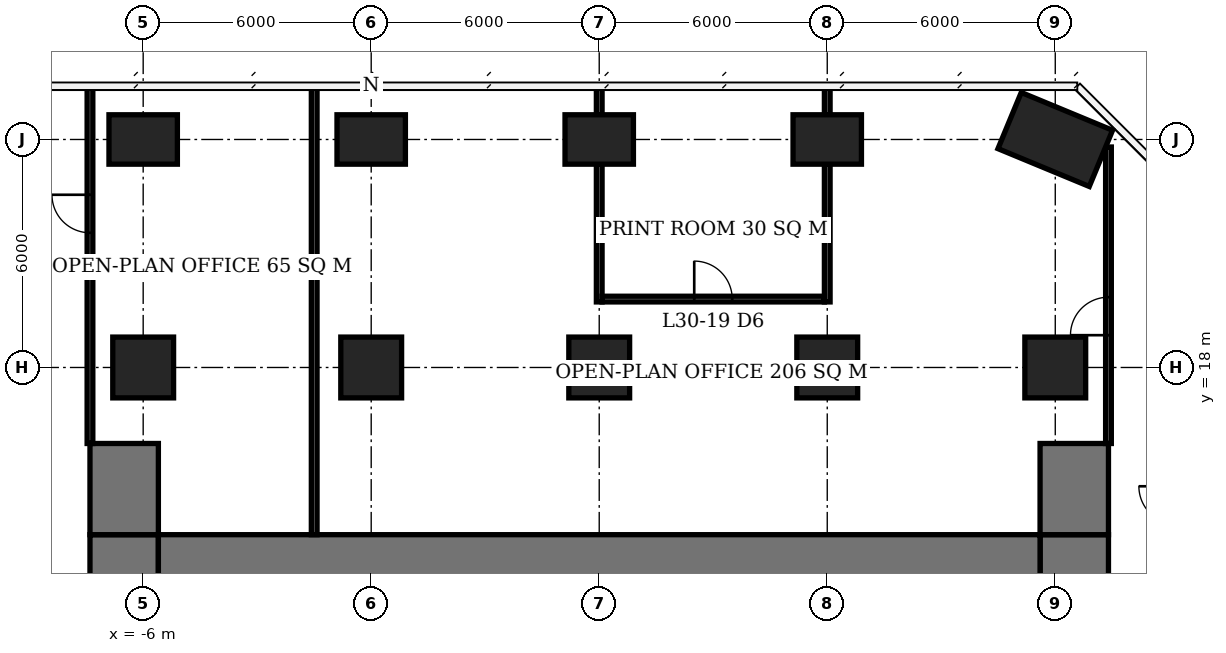
"""IFC4 building model, lengths in metres.
Left out: names, types, materials, properties, quantities, classifications, styles, units other than length and angle.
Written with IfcOpenShell. Run it as: python <this file> out.ifc"""

import sys

from ifc_helpers import new_model, si_unit, direction, frame, frame_2d, origin, origin_2d, place, context, subcontext, project, spatial, rectangle, extrude, element, fill, save


model = new_model("IFC4")
c1 = context("Model", 3, precision=1e-05, world=origin(), true_north=direction((0.0, 1.0)))
c2 = subcontext(c1, "Body", "Model", "MODEL_VIEW")
j1 = project(units=[si_unit("LENGTHUNIT", "METRE"), si_unit("PLANEANGLEUNIT", "RADIAN")], contexts=[c1])
p1 = place(None, origin())
s1 = spatial("IfcSite", under=j1, at=p1, CompositionType="ELEMENT")
p2 = place(p1, origin())
s2 = spatial("IfcBuilding", under=s1, at=p2, CompositionType="ELEMENT")
p3 = place(p2, frame((0.0, 0.0, 125.0)))
s3 = spatial("IfcBuildingStorey", under=s2, at=p3, CompositionType="ELEMENT", Elevation=125.0)
p4 = place(p3, frame((-6.0, 18.0, 0.0), z_axis=(0.0, 0.0, 1.0), x_axis=(1.0, 0.0, 0.0)))
e1 = element("IfcColumn", 1, at=p4, inside=s3, PredefinedType="COLUMN", context=c2, shape_type="SweptSolid", body=[
    extrude(rectangle(XDim=1.6, YDim=1.6, at=origin_2d()), origin(), (0.0, 0.0, 1.0), 3.9),
])
p5 = place(p3, frame((-6.0, 24.0, 0.0), z_axis=(0.0, 0.0, 1.0), x_axis=(1.0, 0.0, 0.0)))
e2 = element("IfcColumn", 2, at=p5, inside=s3, PredefinedType="COLUMN", context=c2, shape_type="SweptSolid", body=[
    extrude(rectangle(XDim=1.8, YDim=1.3, at=origin_2d()), origin(), (0.0, 0.0, 1.0), 3.9),
])
p6 = place(p3, frame((0.0, 18.0, 0.0), z_axis=(0.0, 0.0, 1.0), x_axis=(1.0, 0.0, 0.0)))
e3 = element("IfcColumn", 3, at=p6, inside=s3, PredefinedType="COLUMN", context=c2, shape_type="SweptSolid", body=[
    extrude(rectangle(XDim=1.6, YDim=1.6, at=origin_2d()), origin(), (0.0, 0.0, 1.0), 3.9),
])
p7 = place(p3, frame((0.0, 24.0, 0.0), z_axis=(0.0, 0.0, 1.0), x_axis=(1.0, 0.0, 0.0)))
e4 = element("IfcColumn", 4, at=p7, inside=s3, PredefinedType="COLUMN", context=c2, shape_type="SweptSolid", body=[
    extrude(rectangle(XDim=1.8, YDim=1.3, at=origin_2d()), origin(), (0.0, 0.0, 1.0), 3.9),
])
p8 = place(p3, frame((6.0, 18.0, 0.0), z_axis=(0.0, 0.0, 1.0), x_axis=(1.0, 0.0, 0.0)))
e5 = element("IfcColumn", 5, at=p8, inside=s3, PredefinedType="COLUMN", context=c2, shape_type="SweptSolid", body=[
    extrude(rectangle(XDim=1.6, YDim=1.6, at=origin_2d()), origin(), (0.0, 0.0, 1.0), 3.9),
])
p9 = place(p3, frame((6.0, 24.0, 0.0), z_axis=(0.0, 0.0, 1.0), x_axis=(1.0, 0.0, 0.0)))
e6 = element("IfcColumn", 6, at=p9, inside=s3, PredefinedType="COLUMN", context=c2, shape_type="SweptSolid", body=[
    extrude(rectangle(XDim=1.8, YDim=1.3, at=origin_2d()), origin(), (0.0, 0.0, 1.0), 3.9),
])
p10 = place(p3, frame((12.0, 18.0, 0.0), z_axis=(0.0, 0.0, 1.0), x_axis=(1.0, 0.0, 0.0)))
e7 = element("IfcColumn", 7, at=p10, inside=s3, PredefinedType="COLUMN", context=c2, shape_type="SweptSolid", body=[
    extrude(rectangle(XDim=1.6, YDim=1.6, at=origin_2d()), origin(), (0.0, 0.0, 1.0), 3.9),
])
p11 = place(p3, frame((12.0, 24.0, 0.0), z_axis=(0.0, 0.0, 1.0), x_axis=(1.0, 0.0, 0.0)))
e8 = element("IfcColumn", 8, at=p11, inside=s3, PredefinedType="COLUMN", context=c2, shape_type="SweptSolid", body=[
    extrude(rectangle(XDim=1.8, YDim=1.3, at=origin_2d()), origin(), (0.0, 0.0, 1.0), 3.9),
])
p12 = place(p3, frame((18.0, 18.0, 0.0), z_axis=(0.0, 0.0, 1.0), x_axis=(1.0, 0.0, 0.0)))
e9 = element("IfcColumn", 9, at=p12, inside=s3, PredefinedType="COLUMN", context=c2, shape_type="SweptSolid", body=[
    extrude(rectangle(XDim=1.6, YDim=1.6, at=origin_2d()), origin(), (0.0, 0.0, 1.0), 3.9),
])
p13 = place(p3, frame((18.0, 24.0, 0.0), z_axis=(0.0, 0.0, 1.0), x_axis=(0.923879532511, -0.382683432365, 0.0)))
e10 = element("IfcColumn", 10, at=p13, inside=s3, PredefinedType="COLUMN", context=c2, shape_type="SweptSolid", body=[
    extrude(rectangle(XDim=2.6, YDim=1.6, at=origin_2d()), origin(), (0.0, 0.0, 1.0), 3.9),
])
p14 = place(p3, frame((-5.6, 12.6, 0.0), z_axis=(0.0, 0.0, 1.0), x_axis=(1.0, 0.0, 0.0)))
e11 = element("IfcWall", 11, at=p14, inside=s3, PredefinedType="SHEAR", context=c2, shape_type="SweptSolid", body=[
    extrude(rectangle(XDim=23.2, YDim=2.0, at=frame_2d((11.6, 0.0))), origin(), (0.0, 0.0, 1.0), 3.9),
])
p15 = place(p3, frame((-6.5, -7.6, 0.0), z_axis=(0.0, 0.0, 1.0), x_axis=(0.0, 1.0, 0.0)))
e12 = element("IfcWall", 12, at=p15, inside=s3, PredefinedType="SHEAR", context=c2, shape_type="SweptSolid", body=[
    extrude(rectangle(XDim=21.2, YDim=1.8, at=frame_2d((10.6, 0.0))), origin(), (0.0, 0.0, 1.0), 3.9),
])
p16 = place(p15, frame((7.8, 0.0, 0.0)))
e13 = element("IfcOpeningElement", 13, at=p16, cuts=e12, PredefinedType="OPENING", context=c2, shape_type="SweptSolid", body=[
    extrude(rectangle(XDim=1.8, YDim=2.4, at=frame_2d((0.9, 1.2))), frame((0.0, 0.91, 0.0), z_axis=(0.0, -1.0, 0.0), x_axis=(1.0, 0.0, 0.0)), (0.0, 0.0, 1.0), 1.82),
])
p17 = place(p3, frame((18.5, -7.6, 0.0), z_axis=(0.0, 0.0, 1.0), x_axis=(0.0, 1.0, 0.0)))
e14 = element("IfcWall", 14, at=p17, inside=s3, PredefinedType="SHEAR", context=c2, shape_type="SweptSolid", body=[
    extrude(rectangle(XDim=21.2, YDim=1.8, at=frame_2d((10.6, 0.0))), origin(), (0.0, 0.0, 1.0), 3.9),
])
p18 = place(p17, frame((9.2, 0.0, 0.0)))
e15 = element("IfcOpeningElement", 15, at=p18, cuts=e14, PredefinedType="OPENING", context=c2, shape_type="SweptSolid", body=[
    extrude(rectangle(XDim=1.8, YDim=2.4, at=frame_2d((0.9, 1.2))), frame((0.0, 0.91, 0.0), z_axis=(0.0, -1.0, 0.0), x_axis=(1.0, 0.0, 0.0)), (0.0, 0.0, 1.0), 1.82),
])
for number, where, z_axis, x_axis in (
    (16, (-6.5, 13.6, 0.0), (0.0, 0.0, 1.0), (0.0, 1.0, 0.0)),
    (17, (18.5, 13.6, 0.0), (0.0, 0.0, 1.0), (0.0, 1.0, 0.0)),
):
    element("IfcWall", number, at=place(p3, frame(where, z_axis=z_axis, x_axis=x_axis)), inside=s3, PredefinedType="SHEAR", context=c2, shape_type="SweptSolid", body=[
        extrude(rectangle(XDim=2.4, YDim=1.8, at=frame_2d((1.2, 0.0))), origin(), (0.0, 0.0, 1.0), 3.9),
    ])
p19 = place(p3, frame((6.075, 19.8, 0.0), z_axis=(0.0, 0.0, 1.0), x_axis=(1.0, 0.0, 0.0)))
e18 = element("IfcWall", 18, at=p19, inside=s3, PredefinedType="PARTITIONING", context=c2, shape_type="SweptSolid", body=[
    extrude(rectangle(XDim=5.85, YDim=0.15, at=frame_2d((2.925, 0.0))), origin(), (0.0, 0.0, 1.0), 3.65),
])
p20 = place(p19, frame((2.425, 0.0, 0.0)))
e19 = element("IfcOpeningElement", 19, at=p20, cuts=e18, PredefinedType="OPENING", context=c2, shape_type="SweptSolid", body=[
    extrude(rectangle(XDim=1.0, YDim=2.1, at=frame_2d((0.5, 1.05))), frame((0.0, 0.085, 0.0), z_axis=(0.0, -1.0, 0.0), x_axis=(1.0, 0.0, 0.0)), (0.0, 0.0, 1.0), 0.17),
])
p21 = place(p3, frame((6.0, 19.725, 0.0), z_axis=(0.0, 0.0, 1.0), x_axis=(0.0, 1.0, 0.0)))
e20 = element("IfcWall", 20, at=p21, inside=s3, PredefinedType="PARTITIONING", context=c2, shape_type="SweptSolid", body=[
    extrude(rectangle(XDim=3.625, YDim=0.15, at=frame_2d((1.812, 0.0))), origin(), (0.0, 0.0, 1.0), 3.65),
])
p22 = place(p3, frame((6.0, 24.65, 0.0), z_axis=(0.0, 0.0, 1.0), x_axis=(0.0, 1.0, 0.0)))
e21 = element("IfcWall", 21, at=p22, inside=s3, PredefinedType="PARTITIONING", context=c2, shape_type="SweptSolid", body=[
    extrude(rectangle(XDim=0.75, YDim=0.15, at=frame_2d((0.375, 0.0))), origin(), (0.0, 0.0, 1.0), 3.65),
])
p23 = place(p3, frame((12.0, 19.725, 0.0), z_axis=(0.0, 0.0, 1.0), x_axis=(0.0, 1.0, 0.0)))
e22 = element("IfcWall", 22, at=p23, inside=s3, PredefinedType="PARTITIONING", context=c2, shape_type="SweptSolid", body=[
    extrude(rectangle(XDim=3.625, YDim=0.15, at=frame_2d((1.812, 0.0))), origin(), (0.0, 0.0, 1.0), 3.65),
])
p24 = place(p3, frame((12.0, 24.65, 0.0), z_axis=(0.0, 0.0, 1.0), x_axis=(0.0, 1.0, 0.0)))
e23 = element("IfcWall", 23, at=p24, inside=s3, PredefinedType="PARTITIONING", context=c2, shape_type="SweptSolid", body=[
    extrude(rectangle(XDim=0.75, YDim=0.15, at=frame_2d((0.375, 0.0))), origin(), (0.0, 0.0, 1.0), 3.65),
])
p25 = place(p3, frame((-7.4, 16.0, 0.0), z_axis=(0.0, 0.0, 1.0), x_axis=(0.0, 1.0, 0.0)))
e24 = element("IfcWall", 24, at=p25, inside=s3, PredefinedType="PARTITIONING", context=c2, shape_type="SweptSolid", body=[
    extrude(rectangle(XDim=9.4, YDim=0.15, at=frame_2d((4.7, 0.0))), origin(), (0.0, 0.0, 1.0), 3.65),
])
p26 = place(p25, frame((5.545, 0.0, 0.0)))
e25 = element("IfcOpeningElement", 25, at=p26, cuts=e24, PredefinedType="OPENING", context=c2, shape_type="SweptSolid", body=[
    extrude(rectangle(XDim=1.0, YDim=2.1, at=frame_2d((0.5, 1.05))), frame((0.0, 0.085, 0.0), z_axis=(0.0, -1.0, 0.0), x_axis=(1.0, 0.0, 0.0)), (0.0, 0.0, 1.0), 0.17),
])
p27 = place(p3, frame((-1.5, 13.6, 0.0), z_axis=(0.0, 0.0, 1.0), x_axis=(0.0, 1.0, 0.0)))
e26 = element("IfcWall", 26, at=p27, inside=s3, PredefinedType="PARTITIONING", context=c2, shape_type="SweptSolid", body=[
    extrude(rectangle(XDim=11.8, YDim=0.15, at=frame_2d((5.9, 0.0))), origin(), (0.0, 0.0, 1.0), 3.65),
])
p28 = place(p3, frame((19.4, 16.0, 0.0), z_axis=(0.0, 0.0, 1.0), x_axis=(0.0, 1.0, 0.0)))
e27 = element("IfcWall", 27, at=p28, inside=s3, PredefinedType="PARTITIONING", context=c2, shape_type="SweptSolid", body=[
    extrude(rectangle(XDim=7.802, YDim=0.15, at=frame_2d((3.901, 0.0))), origin(), (0.0, 0.0, 1.0), 3.65),
])
p29 = place(p28, frame((2.85, 0.0, 0.0)))
e28 = element("IfcOpeningElement", 28, at=p29, cuts=e27, PredefinedType="OPENING", context=c2, shape_type="SweptSolid", body=[
    extrude(rectangle(XDim=1.0, YDim=2.1, at=frame_2d((0.5, 1.05))), frame((0.0, 0.085, 0.0), z_axis=(0.0, -1.0, 0.0), x_axis=(1.0, 0.0, 0.0)), (0.0, 0.0, 1.0), 0.17),
])
p30 = place(p20, origin())
e29 = element("IfcDoor", 29, at=p30, inside=s3, OperationType="SINGLE_SWING_LEFT", PredefinedType="DOOR", context=c2, shape_type="SweptSolid", body=[
    extrude(rectangle(XDim=1.0, YDim=2.1, at=frame_2d((0.5, 1.05))), frame((0.0, 0.025, 0.0), z_axis=(0.0, -1.0, 0.0), x_axis=(1.0, 0.0, 0.0)), (0.0, 0.0, 1.0), 0.05),
])
fill(e19, e29)
p31 = place(p26, origin())
e30 = element("IfcDoor", 30, at=p31, inside=s3, OperationType="SINGLE_SWING_RIGHT", PredefinedType="DOOR", context=c2, shape_type="SweptSolid", body=[
    extrude(rectangle(XDim=1.0, YDim=2.1, at=frame_2d((0.5, 1.05))), frame((0.0, 0.025, 0.0), z_axis=(0.0, -1.0, 0.0), x_axis=(1.0, 0.0, 0.0)), (0.0, 0.0, 1.0), 0.05),
])
fill(e25, e30)
p32 = place(p29, origin())
e31 = element("IfcDoor", 31, at=p32, inside=s3, OperationType="SINGLE_SWING_LEFT", PredefinedType="DOOR", context=c2, shape_type="SweptSolid", body=[
    extrude(rectangle(XDim=1.0, YDim=2.1, at=frame_2d((0.5, 1.05))), frame((0.0, 0.025, 0.0), z_axis=(0.0, -1.0, 0.0), x_axis=(1.0, 0.0, 0.0)), (0.0, 0.0, 1.0), 0.05),
])
fill(e28, e31)
save(model, sys.argv[1])
